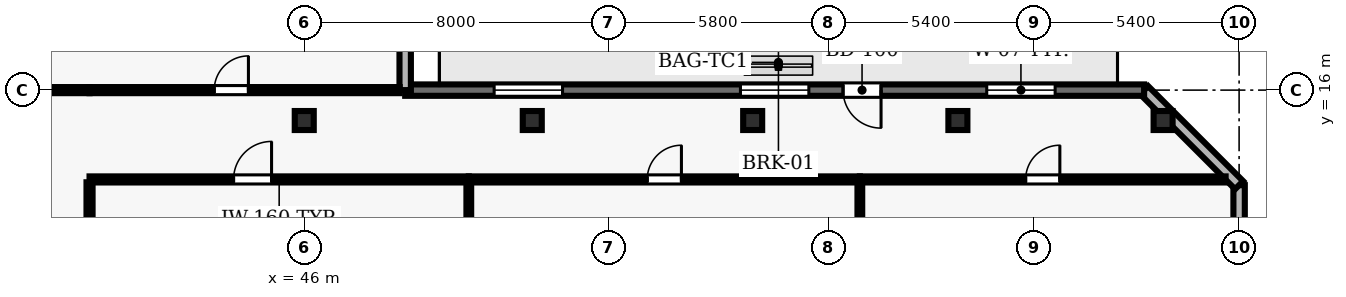
"""IFC4 building model, lengths in metres.
Left out: names, types, materials, properties, quantities, classifications, styles, units other than length and angle.
Written with IfcOpenShell. Run it as: python <this file> out.ifc"""

import sys

from ifc_helpers import new_model, si_unit, direction, frame, frame_2d, origin, origin_2d, place, context, subcontext, project, spatial, rectangle, hollow_rectangle, extrude, element, fill, save


model = new_model("IFC4")
c1 = context("Model", 3, precision=1e-05, world=origin(), true_north=direction((0.0, 1.0)))
c2 = subcontext(c1, "Body", "Model", "MODEL_VIEW")
j1 = project(units=[si_unit("LENGTHUNIT", "METRE"), si_unit("PLANEANGLEUNIT", "RADIAN")], contexts=[c1])
p1 = place(None, origin())
s1 = spatial("IfcSite", under=j1, at=p1, CompositionType="ELEMENT")
p2 = place(p1, origin())
s2 = spatial("IfcBuilding", under=s1, at=p2, CompositionType="ELEMENT")
p3 = place(p2, frame((0.0, 0.0, 111.2)))
s3 = spatial("IfcBuildingStorey", under=s2, at=p3, CompositionType="ELEMENT", Elevation=111.2)
for number, where, z_axis, x_axis in (
    (1, (46.0, 15.2, 0.0), (0.0, 0.0, 1.0), (1.0, 0.0, 0.0)),
    (2, (52.0, 15.2, 0.0), (0.0, 0.0, 1.0), (1.0, 0.0, 0.0)),
    (3, (57.8, 15.2, 0.0), (0.0, 0.0, 1.0), (1.0, 0.0, 0.0)),
    (4, (63.2, 15.2, 0.0), (0.0, 0.0, 1.0), (1.0, 0.0, 0.0)),
    (5, (68.6, 15.2, 0.0), (0.0, 0.0, 1.0), (1.0, 0.0, 0.0)),
):
    element("IfcColumn", number, at=place(p3, frame(where, z_axis=z_axis, x_axis=x_axis)), inside=s3, PredefinedType="COLUMN", context=c2, shape_type="SweptSolid", body=[
        extrude(hollow_rectangle(XDim=0.5, YDim=0.5, WallThickness=0.025, at=origin_2d()), origin(), (0.0, 0.0, 1.0), 3.9),
    ])
p4 = place(p3, frame((70.6, 2.5, 0.0), z_axis=(0.0, 0.0, 1.0), x_axis=(0.0, 1.0, 0.0)))
e6 = element("IfcWall", 6, at=p4, inside=s3, PredefinedType="SOLIDWALL", context=c2, shape_type="SweptSolid", body=[
    extrude(rectangle(XDim=11.0, YDim=0.3, at=frame_2d((5.5, 0.0))), origin(), (0.0, 0.0, 1.0), 3.69),
])
p5 = place(p4, frame((1.55, 0.0, 0.9)))
e7 = element("IfcOpeningElement", 7, at=p5, cuts=e6, PredefinedType="OPENING", context=c2, shape_type="SweptSolid", body=[
    extrude(rectangle(XDim=2.4, YDim=1.6, at=frame_2d((1.2, 0.8))), frame((0.0, 0.16, 0.0), z_axis=(0.0, -1.0, 0.0), x_axis=(1.0, 0.0, 0.0)), (0.0, 0.0, 1.0), 0.32),
])
p6 = place(p4, frame((7.05, 0.0, 0.9)))
e8 = element("IfcOpeningElement", 8, at=p6, cuts=e6, PredefinedType="OPENING", context=c2, shape_type="SweptSolid", body=[
    extrude(rectangle(XDim=2.4, YDim=1.6, at=frame_2d((1.2, 0.8))), frame((0.0, 0.16, 0.0), z_axis=(0.0, -1.0, 0.0), x_axis=(1.0, 0.0, 0.0)), (0.0, 0.0, 1.0), 0.32),
])
p7 = place(p3, frame((70.6, 13.5, 0.0), z_axis=(0.0, 0.0, 1.0), x_axis=(-0.707106781187, 0.707106781187, 0.0)))
e9 = element("IfcWall", 9, at=p7, inside=s3, PredefinedType="SOLIDWALL", context=c2, shape_type="SweptSolid", body=[
    extrude(rectangle(XDim=3.536, YDim=0.3, at=frame_2d((1.768, 0.0))), origin(), (0.0, 0.0, 1.0), 3.69),
])
p8 = place(p3, frame((68.1, 16.0, 0.0), z_axis=(0.0, 0.0, 1.0), x_axis=(-1.0, 0.0, 0.0)))
e10 = element("IfcWall", 10, at=p8, inside=s3, PredefinedType="SOLIDWALL", context=c2, shape_type="SweptSolid", body=[
    extrude(rectangle(XDim=19.444, YDim=0.3, at=frame_2d((9.722, 0.0))), origin(), (0.0, 0.0, 1.0), 3.69),
])
p9 = place(p8, frame((6.922, 0.0, 0.0)))
e11 = element("IfcOpeningElement", 11, at=p9, cuts=e10, PredefinedType="OPENING", context=c2, shape_type="SweptSolid", body=[
    extrude(rectangle(XDim=1.0, YDim=2.2, at=frame_2d((0.5, 1.1))), frame((0.0, 0.16, 0.0), z_axis=(0.0, -1.0, 0.0), x_axis=(1.0, 0.0, 0.0)), (0.0, 0.0, 1.0), 0.32),
])
p10 = place(p8, frame((2.341, 0.0, 0.9)))
e12 = element("IfcOpeningElement", 12, at=p10, cuts=e10, PredefinedType="OPENING", context=c2, shape_type="SweptSolid", body=[
    extrude(rectangle(XDim=1.8, YDim=1.8, at=frame_2d((0.9, 0.9))), frame((0.0, 0.16, 0.0), z_axis=(0.0, -1.0, 0.0), x_axis=(1.0, 0.0, 0.0)), (0.0, 0.0, 1.0), 0.32),
])
p11 = place(p8, frame((8.822, 0.0, 0.9)))
e13 = element("IfcOpeningElement", 13, at=p11, cuts=e10, PredefinedType="OPENING", context=c2, shape_type="SweptSolid", body=[
    extrude(rectangle(XDim=1.8, YDim=1.8, at=frame_2d((0.9, 0.9))), frame((0.0, 0.16, 0.0), z_axis=(0.0, -1.0, 0.0), x_axis=(1.0, 0.0, 0.0)), (0.0, 0.0, 1.0), 0.32),
])
p12 = place(p8, frame((15.303, 0.0, 0.9)))
e14 = element("IfcOpeningElement", 14, at=p12, cuts=e10, PredefinedType="OPENING", context=c2, shape_type="SweptSolid", body=[
    extrude(rectangle(XDim=1.8, YDim=1.8, at=frame_2d((0.9, 0.9))), frame((0.0, 0.16, 0.0), z_axis=(0.0, -1.0, 0.0), x_axis=(1.0, 0.0, 0.0)), (0.0, 0.0, 1.0), 0.32),
])
p13 = place(p3, frame((48.656, 16.0, 0.0), z_axis=(0.0, 0.0, 1.0), x_axis=(0.0, 1.0, 0.0)))
e15 = element("IfcWall", 15, at=p13, inside=s3, PredefinedType="SOLIDWALL", context=c2, shape_type="SweptSolid", body=[
    extrude(rectangle(XDim=13.6, YDim=0.3, at=frame_2d((6.8, 0.0))), origin(), (0.0, 0.0, 1.0), 3.69),
])
p14 = place(p13, frame((2.2, 0.0, 0.9)))
e16 = element("IfcOpeningElement", 16, at=p14, cuts=e15, PredefinedType="OPENING", context=c2, shape_type="SweptSolid", body=[
    extrude(rectangle(XDim=2.4, YDim=1.8, at=frame_2d((1.2, 0.9))), frame((0.0, 0.16, 0.0), z_axis=(0.0, -1.0, 0.0), x_axis=(1.0, 0.0, 0.0)), (0.0, 0.0, 1.0), 0.32),
])
p15 = place(p13, frame((9.0, 0.0, 0.9)))
e17 = element("IfcOpeningElement", 17, at=p15, cuts=e15, PredefinedType="OPENING", context=c2, shape_type="SweptSolid", body=[
    extrude(rectangle(XDim=2.4, YDim=1.8, at=frame_2d((1.2, 0.9))), frame((0.0, 0.16, 0.0), z_axis=(0.0, -1.0, 0.0), x_axis=(1.0, 0.0, 0.0)), (0.0, 0.0, 1.0), 0.32),
])
p16 = place(p3, frame((40.35, 13.65, 0.0), z_axis=(0.0, 0.0, 1.0), x_axis=(1.0, 0.0, 0.0)))
e18 = element("IfcWall", 18, at=p16, inside=s3, PredefinedType="PARTITIONING", context=c2, shape_type="SweptSolid", body=[
    extrude(rectangle(XDim=9.98, YDim=0.16, at=frame_2d((4.99, 0.0))), origin(), (0.0, 0.0, 1.0), 3.69),
])
p17 = place(p16, frame((3.79, 0.0, 0.0)))
e19 = element("IfcOpeningElement", 19, at=p17, cuts=e18, PredefinedType="OPENING", context=c2, shape_type="SweptSolid", body=[
    extrude(rectangle(XDim=1.0, YDim=2.1, at=frame_2d((0.5, 1.05))), frame((0.0, 0.09, 0.0), z_axis=(0.0, -1.0, 0.0), x_axis=(1.0, 0.0, 0.0)), (0.0, 0.0, 1.0), 0.18),
])
p18 = place(p3, frame((40.35, 16.0, 0.0), z_axis=(0.0, 0.0, 1.0), x_axis=(-1.0, 0.0, 0.0)))
e20 = element("IfcWall", 20, at=p18, inside=s3, PredefinedType="PARTITIONING", context=c2, shape_type="SweptSolid", body=[
    extrude(rectangle(XDim=2.3, YDim=0.16, at=frame_2d((1.15, 0.0))), origin(), (0.0, 0.0, 1.0), 3.69),
])
p19 = place(p3, frame((40.35, 16.0, 0.0), z_axis=(0.0, 0.0, 1.0), x_axis=(1.0, 0.0, 0.0)))
e21 = element("IfcWall", 21, at=p19, inside=s3, PredefinedType="PARTITIONING", context=c2, shape_type="SweptSolid", body=[
    extrude(rectangle(XDim=8.161, YDim=0.16, at=frame_2d((4.081, 0.0))), origin(), (0.0, 0.0, 1.0), 3.69),
])
p20 = place(p19, frame((3.281, 0.0, 0.0)))
e22 = element("IfcOpeningElement", 22, at=p20, cuts=e21, PredefinedType="OPENING", context=c2, shape_type="SweptSolid", body=[
    extrude(rectangle(XDim=0.9, YDim=2.1, at=frame_2d((0.45, 1.05))), frame((0.0, 0.09, 0.0), z_axis=(0.0, -1.0, 0.0), x_axis=(1.0, 0.0, 0.0)), (0.0, 0.0, 1.0), 0.18),
])
p21 = place(p3, frame((50.33, 13.65, 0.0), z_axis=(0.0, 0.0, 1.0), x_axis=(1.0, 0.0, 0.0)))
e23 = element("IfcWall", 23, at=p21, inside=s3, PredefinedType="PARTITIONING", context=c2, shape_type="SweptSolid", body=[
    extrude(rectangle(XDim=10.29, YDim=0.16, at=frame_2d((5.145, 0.0))), origin(), (0.0, 0.0, 1.0), 3.69),
])
p22 = place(p21, frame((4.695, 0.0, 0.0)))
e24 = element("IfcOpeningElement", 24, at=p22, cuts=e23, PredefinedType="OPENING", context=c2, shape_type="SweptSolid", body=[
    extrude(rectangle(XDim=0.9, YDim=2.1, at=frame_2d((0.45, 1.05))), frame((0.0, 0.09, 0.0), z_axis=(0.0, -1.0, 0.0), x_axis=(1.0, 0.0, 0.0)), (0.0, 0.0, 1.0), 0.18),
])
p23 = place(p3, frame((60.62, 13.65, 0.0), z_axis=(0.0, 0.0, 1.0), x_axis=(1.0, 0.0, 0.0)))
e25 = element("IfcWall", 25, at=p23, inside=s3, PredefinedType="PARTITIONING", context=c2, shape_type="SweptSolid", body=[
    extrude(rectangle(XDim=9.625, YDim=0.16, at=frame_2d((4.812, 0.0))), origin(), (0.0, 0.0, 1.0), 3.69),
])
p24 = place(p23, frame((4.363, 0.0, 0.0)))
e26 = element("IfcOpeningElement", 26, at=p24, cuts=e25, PredefinedType="OPENING", context=c2, shape_type="SweptSolid", body=[
    extrude(rectangle(XDim=0.9, YDim=2.1, at=frame_2d((0.45, 1.05))), frame((0.0, 0.09, 0.0), z_axis=(0.0, -1.0, 0.0), x_axis=(1.0, 0.0, 0.0)), (0.0, 0.0, 1.0), 0.18),
])
p25 = place(p3, frame((40.35, 8.0, 0.0), z_axis=(0.0, 0.0, 1.0), x_axis=(0.0, 1.0, 0.0)))
e27 = element("IfcWall", 27, at=p25, inside=s3, PredefinedType="PARTITIONING", context=c2, shape_type="SweptSolid", body=[
    extrude(rectangle(XDim=5.575, YDim=0.16, at=frame_2d((2.788, 0.0))), origin(), (0.0, 0.0, 1.0), 3.69),
])
for number, where, z_axis, x_axis in (
    (28, (50.33, 8.018, 0.0), (0.0, 0.0, 1.0), (0.0, 1.0, 0.0)),
    (29, (60.62, 8.018, 0.0), (0.0, 0.0, 1.0), (0.0, 1.0, 0.0)),
):
    element("IfcWall", number, at=place(p3, frame(where, z_axis=z_axis, x_axis=x_axis)), inside=s3, PredefinedType="PARTITIONING", context=c2, shape_type="SweptSolid", body=[
        extrude(rectangle(XDim=5.557, YDim=0.125, at=frame_2d((2.778, 0.0))), origin(), (0.0, 0.0, 1.0), 3.69),
    ])
p26 = place(p9, origin())
e30 = element("IfcDoor", 30, at=p26, inside=s3, OperationType="SINGLE_SWING_LEFT", PredefinedType="DOOR", context=c2, shape_type="SweptSolid", body=[
    extrude(rectangle(XDim=1.0, YDim=2.2, at=frame_2d((0.5, 1.1))), frame((0.0, 0.025, 0.0), z_axis=(0.0, -1.0, 0.0), x_axis=(1.0, 0.0, 0.0)), (0.0, 0.0, 1.0), 0.05),
])
fill(e11, e30)
p27 = place(p10, origin())
e31 = element("IfcWindow", 31, at=p27, inside=s3, PartitioningType="SINGLE_PANEL", PredefinedType="WINDOW", context=c2, shape_type="SweptSolid", body=[
    extrude(rectangle(XDim=1.8, YDim=1.8, at=frame_2d((0.9, 0.9))), frame((0.0, 0.03, 0.0), z_axis=(0.0, -1.0, 0.0), x_axis=(1.0, 0.0, 0.0)), (0.0, 0.0, 1.0), 0.06),
])
fill(e12, e31)
p28 = place(p11, origin())
e32 = element("IfcWindow", 32, at=p28, inside=s3, PartitioningType="SINGLE_PANEL", PredefinedType="WINDOW", context=c2, shape_type="SweptSolid", body=[
    extrude(rectangle(XDim=1.8, YDim=1.8, at=frame_2d((0.9, 0.9))), frame((0.0, 0.03, 0.0), z_axis=(0.0, -1.0, 0.0), x_axis=(1.0, 0.0, 0.0)), (0.0, 0.0, 1.0), 0.06),
])
fill(e13, e32)
p29 = place(p12, origin())
e33 = element("IfcWindow", 33, at=p29, inside=s3, PartitioningType="SINGLE_PANEL", PredefinedType="WINDOW", context=c2, shape_type="SweptSolid", body=[
    extrude(rectangle(XDim=1.8, YDim=1.8, at=frame_2d((0.9, 0.9))), frame((0.0, 0.03, 0.0), z_axis=(0.0, -1.0, 0.0), x_axis=(1.0, 0.0, 0.0)), (0.0, 0.0, 1.0), 0.06),
])
fill(e14, e33)
p30 = place(p17, origin())
e34 = element("IfcDoor", 34, at=p30, inside=s3, OperationType="SINGLE_SWING_RIGHT", PredefinedType="DOOR", context=c2, shape_type="SweptSolid", body=[
    extrude(rectangle(XDim=1.0, YDim=2.1, at=frame_2d((0.5, 1.05))), frame((0.0, 0.025, 0.0), z_axis=(0.0, -1.0, 0.0), x_axis=(1.0, 0.0, 0.0)), (0.0, 0.0, 1.0), 0.05),
])
fill(e19, e34)
p31 = place(p22, origin())
e35 = element("IfcDoor", 35, at=p31, inside=s3, OperationType="SINGLE_SWING_RIGHT", PredefinedType="DOOR", context=c2, shape_type="SweptSolid", body=[
    extrude(rectangle(XDim=0.9, YDim=2.1, at=frame_2d((0.45, 1.05))), frame((0.0, 0.025, 0.0), z_axis=(0.0, -1.0, 0.0), x_axis=(1.0, 0.0, 0.0)), (0.0, 0.0, 1.0), 0.05),
])
fill(e24, e35)
p32 = place(p24, origin())
e36 = element("IfcDoor", 36, at=p32, inside=s3, OperationType="SINGLE_SWING_RIGHT", PredefinedType="DOOR", context=c2, shape_type="SweptSolid", body=[
    extrude(rectangle(XDim=0.9, YDim=2.1, at=frame_2d((0.45, 1.05))), frame((0.0, 0.025, 0.0), z_axis=(0.0, -1.0, 0.0), x_axis=(1.0, 0.0, 0.0)), (0.0, 0.0, 1.0), 0.05),
])
fill(e26, e36)
p33 = place(p20, origin())
e37 = element("IfcDoor", 37, at=p33, inside=s3, OperationType="SINGLE_SWING_RIGHT", PredefinedType="DOOR", context=c2, shape_type="SweptSolid", body=[
    extrude(rectangle(XDim=0.9, YDim=2.1, at=frame_2d((0.45, 1.05))), frame((0.0, 0.025, 0.0), z_axis=(0.0, -1.0, 0.0), x_axis=(1.0, 0.0, 0.0)), (0.0, 0.0, 1.0), 0.05),
])
fill(e22, e37)
save(model, sys.argv[1])
